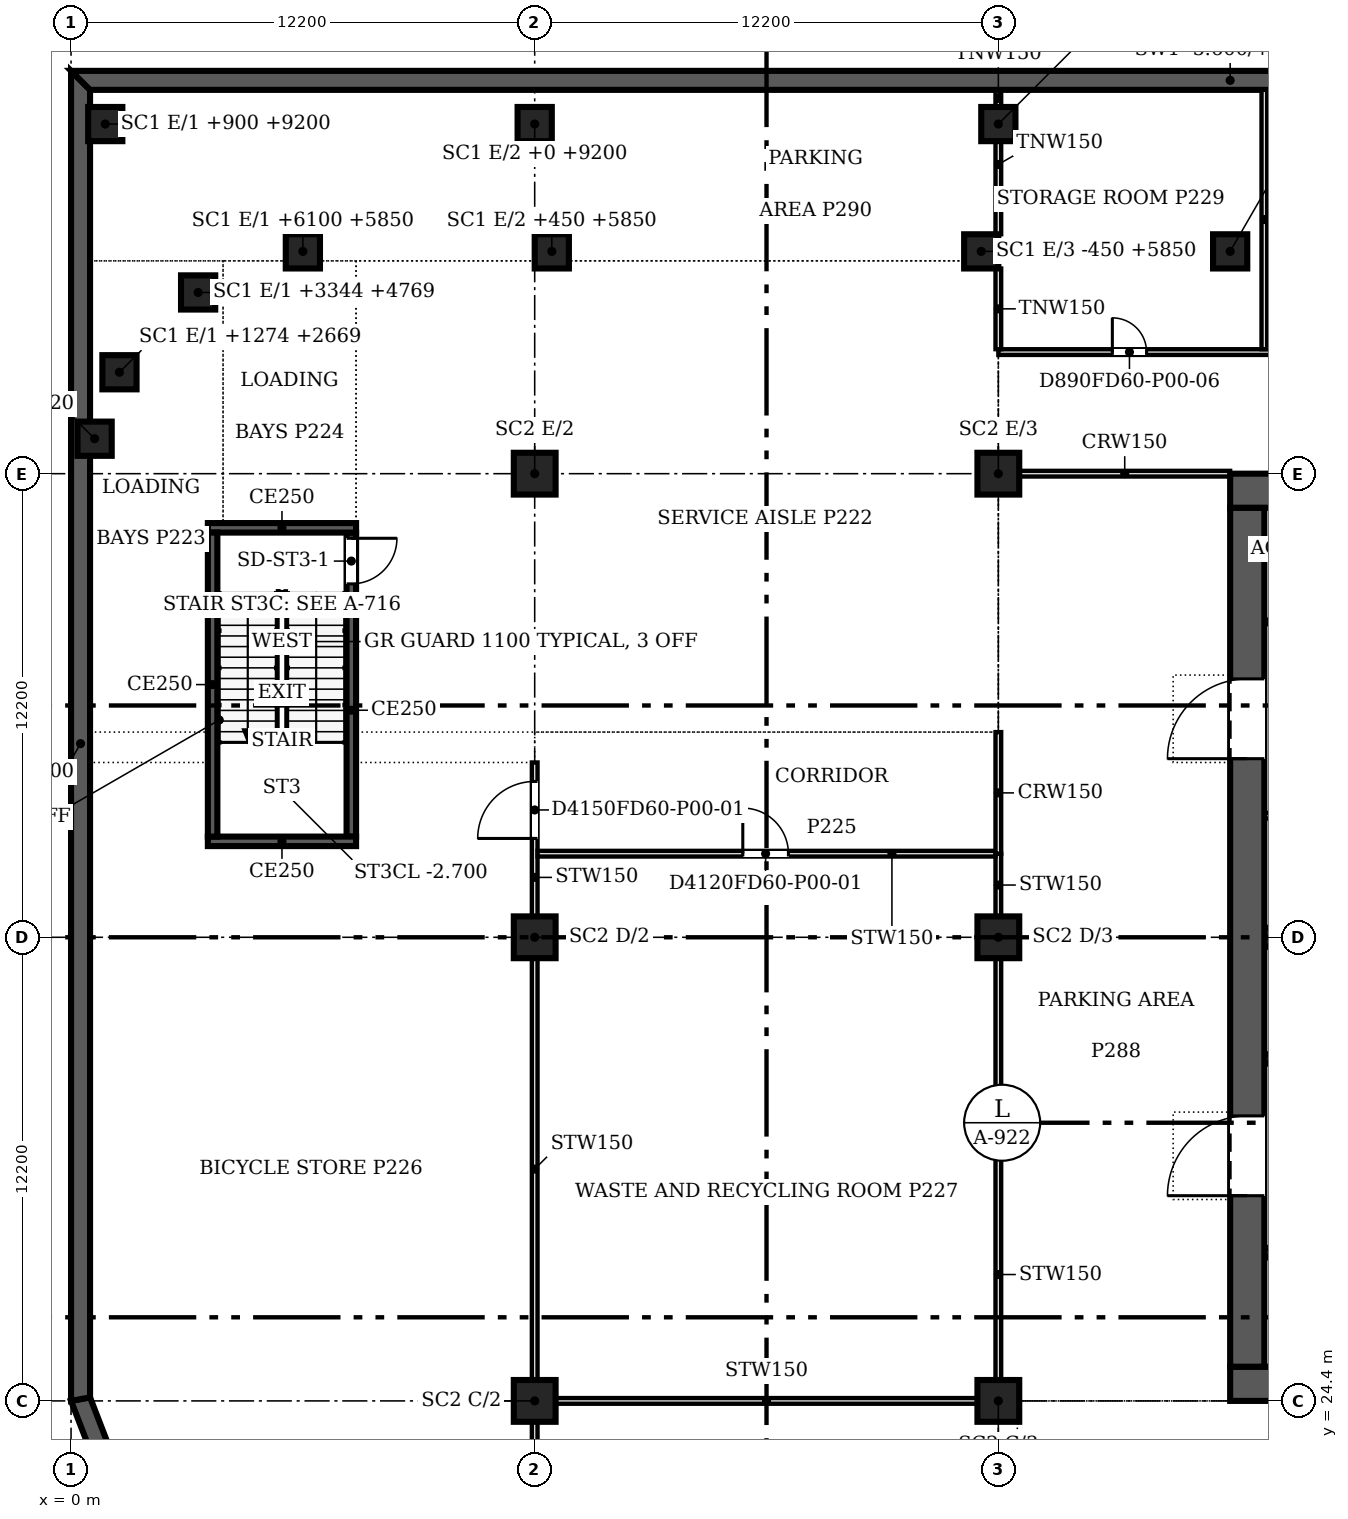
"""IFC4 building model, lengths in metres.
Left out: names, types, materials, properties, quantities, classifications, styles, units other than length and angle.
Written with IfcOpenShell. Run it as: python <this file> out.ifc"""

import sys

from ifc_helpers import new_model, si_unit, direction, frame, frame_2d, origin, origin_2d, place, context, subcontext, project, spatial, polyline, rectangle, outline, extrude, source, transform, mapped, element, fill, save


model = new_model("IFC4")
c1 = context("Model", 3, precision=1e-05, world=origin(), true_north=direction((0.0, 1.0)))
c2 = subcontext(c1, "Body", "Model", "MODEL_VIEW")
j1 = project(units=[si_unit("LENGTHUNIT", "METRE"), si_unit("PLANEANGLEUNIT", "RADIAN")], contexts=[c1])
p1 = place(None, origin())
s1 = spatial("IfcSite", under=j1, at=p1, CompositionType="ELEMENT")
p2 = place(p1, origin())
s2 = spatial("IfcBuilding", under=s1, at=p2, CompositionType="ELEMENT")
p3 = place(p2, frame((0.0, 0.0, -5.4)))
s3 = spatial("IfcBuildingStorey", under=s2, at=p3, CompositionType="ELEMENT", Elevation=-5.4)
p4 = place(p3, frame((0.0, 0.0, -0.2)))
e1 = element("IfcWall", 1, at=p4, inside=s3, PredefinedType="SOLIDWALL", context=c2, shape_type="SweptSolid", body=[
    extrude(outline(polyline([(0.0, 24.4), (1.098, 21.554), (1.526, 21.833), (0.5, 24.493), (0.0, 24.4)])), origin(), (0.0, 0.0, 1.0), 5.6),
])
p5 = place(p3, frame((0.0, 0.0, -0.2)))
e2 = element("IfcWall", 2, at=p5, inside=s3, PredefinedType="SOLIDWALL", context=c2, shape_type="SweptSolid", body=[
    extrude(outline(polyline([(0.0, 24.4), (0.5, 24.493), (0.5, 58.9), (0.0, 59.4), (0.0, 24.4)])), origin(), (0.0, 0.0, 1.0), 5.6),
])
p6 = place(p3, frame((0.0, 0.0, -0.2)))
e3 = element("IfcWall", 3, at=p6, inside=s3, PredefinedType="SOLIDWALL", context=c2, shape_type="SweptSolid", body=[
    extrude(outline(polyline([(0.0, 59.4), (0.5, 58.9), (60.5, 58.9), (61.0, 59.4), (0.0, 59.4)])), origin(), (0.0, 0.0, 1.0), 5.6),
])
for number, where, z_axis, x_axis in (
    (4, (12.65, 54.65, 0.0), (0.0, 0.0, 1.0), (1.0, 0.0, 0.0)),
    (5, (23.95, 54.65, 0.0), (0.0, 0.0, 1.0), (1.0, 0.0, 0.0)),
    (6, (30.5, 54.65, 0.0), (0.0, 0.0, 1.0), (1.0, 0.0, 0.0)),
    (7, (6.1, 54.65, 0.0), (0.0, 0.0, 1.0), (1.0, 0.0, 0.0)),
    (8, (3.344, 53.569, 0.0), (0.0, 0.0, 1.0), (1.0, 0.0, 0.0)),
    (9, (1.274, 51.469, 0.0), (0.0, 0.0, 1.0), (1.0, 0.0, 0.0)),
):
    element("IfcColumn", number, at=place(p3, frame(where, z_axis=z_axis, x_axis=x_axis)), inside=s3, PredefinedType="COLUMN", context=c2, shape_type="SweptSolid", body=[
        extrude(rectangle(XDim=0.9, YDim=0.9, at=origin_2d()), origin(), (0.0, 0.0, 1.0), 5.15),
    ])
for number, where, z_axis, x_axis in (
    (10, (12.2, 24.4, 0.0), (0.0, 0.0, 1.0), (1.0, 0.0, 0.0)),
    (11, (12.2, 36.6, 0.0), (0.0, 0.0, 1.0), (1.0, 0.0, 0.0)),
    (12, (12.2, 48.8, 0.0), (0.0, 0.0, 1.0), (1.0, 0.0, 0.0)),
    (13, (24.4, 24.4, 0.0), (0.0, 0.0, 1.0), (1.0, 0.0, 0.0)),
    (14, (24.4, 36.6, 0.0), (0.0, 0.0, 1.0), (1.0, 0.0, 0.0)),
    (15, (24.4, 48.8, 0.0), (0.0, 0.0, 1.0), (1.0, 0.0, 0.0)),
):
    element("IfcColumn", number, at=place(p3, frame(where, z_axis=z_axis, x_axis=x_axis)), inside=s3, PredefinedType="COLUMN", context=c2, shape_type="SweptSolid", body=[
        extrude(rectangle(XDim=1.1, YDim=1.1, at=origin_2d()), origin(), (0.0, 0.0, 1.0), 5.15),
    ])
for number, where, z_axis, x_axis in (
    (16, (12.2, 58.0, 0.0), (0.0, 0.0, 1.0), (1.0, 0.0, 0.0)),
    (17, (24.4, 58.0, 0.0), (0.0, 0.0, 1.0), (1.0, 0.0, 0.0)),
    (18, (0.9, 58.0, 0.0), (0.0, 0.0, 1.0), (1.0, 0.0, 0.0)),
    (19, (0.62, 49.72, 0.0), (0.0, 0.0, 1.0), (1.0, 0.0, 0.0)),
):
    element("IfcColumn", number, at=place(p3, frame(where, z_axis=z_axis, x_axis=x_axis)), inside=s3, PredefinedType="COLUMN", context=c2, shape_type="SweptSolid", body=[
        extrude(rectangle(XDim=0.9, YDim=0.9, at=origin_2d()), origin(), (0.0, 0.0, 1.0), 5.15),
    ])
p7 = place(p3, frame((54.9, 24.85, 0.0), z_axis=(0.0, 0.0, 1.0), x_axis=(-1.0, 0.0, 0.0)))
e20 = element("IfcWall", 20, at=p7, inside=s3, PredefinedType="SHEAR", context=c2, shape_type="SweptSolid", body=[
    extrude(rectangle(XDim=24.4, YDim=0.9, at=frame_2d((12.2, 0.0))), origin(), (0.0, 0.0, 1.0), 5.4),
])
m1 = source(origin(), c2, "Body", "SweptSolid", [
    extrude(rectangle(XDim=1.2, YDim=2.1, at=frame_2d((0.6, 1.05))), frame((0.0, 0.46, 0.0), z_axis=(0.0, -1.0, 0.0), x_axis=(1.0, 0.0, 0.0)), (0.0, 0.0, 1.0), 0.92),
])
p8 = place(p7, frame((1.5, 0.0, 0.0)))
e21 = element("IfcOpeningElement", 21, at=p8, cuts=e20, PredefinedType="OPENING", context=c2, shape_type="MappedRepresentation", body=[
    mapped(m1, transform((0.0, 0.0, 0.0), scale=1.0)),
])
p9 = place(p3, frame((30.95, 25.3, 0.0), z_axis=(0.0, 0.0, 1.0), x_axis=(0.0, 1.0, 0.0)))
e22 = element("IfcWall", 22, at=p9, inside=s3, PredefinedType="SHEAR", context=c2, shape_type="SweptSolid", body=[
    extrude(rectangle(XDim=22.6, YDim=0.9, at=frame_2d((11.3, 0.0))), origin(), (0.0, 0.0, 1.0), 5.4),
])
m2 = source(origin(), c2, "Body", "SweptSolid", [
    extrude(rectangle(XDim=2.1, YDim=2.4, at=frame_2d((1.05, 1.2))), frame((0.0, 0.46, 0.0), z_axis=(0.0, -1.0, 0.0), x_axis=(1.0, 0.0, 0.0)), (0.0, 0.0, 1.0), 0.92),
])
p10 = place(p9, frame((4.5, 0.0, 0.0)))
e23 = element("IfcOpeningElement", 23, at=p10, cuts=e22, PredefinedType="OPENING", context=c2, shape_type="MappedRepresentation", body=[
    mapped(m2, transform((0.0, 0.0, 0.0), scale=1.0)),
])
p11 = place(p9, frame((16.0, 0.0, 0.0)))
e24 = element("IfcOpeningElement", 24, at=p11, cuts=e22, PredefinedType="OPENING", context=c2, shape_type="MappedRepresentation", body=[
    mapped(m2, transform((0.0, 0.0, 0.0), scale=1.0)),
])
p12 = place(p3, frame((30.5, 48.35, 0.0), z_axis=(0.0, 0.0, 1.0), x_axis=(1.0, 0.0, 0.0)))
e25 = element("IfcWall", 25, at=p12, inside=s3, PredefinedType="SHEAR", context=c2, shape_type="SweptSolid", body=[
    extrude(rectangle(XDim=24.4, YDim=0.9, at=frame_2d((12.2, 0.0))), origin(), (0.0, 0.0, 1.0), 5.4),
])
p13 = place(p3, frame((31.4, 36.6, 0.0), z_axis=(0.0, 0.0, 1.0), x_axis=(1.0, 0.0, 0.0)))
e26 = element("IfcWall", 26, at=p13, inside=s3, PredefinedType="SHEAR", context=c2, shape_type="SweptSolid", body=[
    extrude(rectangle(XDim=16.95, YDim=0.5, at=frame_2d((8.475, 0.0))), origin(), (0.0, 0.0, 1.0), 5.4),
])
for number, where, z_axis, x_axis in (
    (27, (31.4, 33.4, 0.0), (0.0, 0.0, 1.0), (1.0, 0.0, 0.0)),
    (28, (31.4, 28.3, 0.0), (0.0, 0.0, 1.0), (1.0, 0.0, 0.0)),
):
    element("IfcWall", number, at=place(p3, frame(where, z_axis=z_axis, x_axis=x_axis)), inside=s3, PredefinedType="SOLIDWALL", context=c2, shape_type="SweptSolid", body=[
        extrude(rectangle(XDim=11.05, YDim=0.25, at=frame_2d((5.525, 0.0))), origin(), (0.0, 0.0, 1.0), 5.4),
    ])
p14 = place(p3, frame((31.4, 44.9, 0.0), z_axis=(0.0, 0.0, 1.0), x_axis=(1.0, 0.0, 0.0)))
e29 = element("IfcWall", 29, at=p14, inside=s3, PredefinedType="PARTITIONING", context=c2, shape_type="SweptSolid", body=[
    extrude(rectangle(XDim=11.05, YDim=0.12, at=frame_2d((5.525, 0.0))), origin(), (0.0, 0.0, 1.0), 5.15),
])
m3 = source(origin(), c2, "Body", "SweptSolid", [
    extrude(rectangle(XDim=0.9, YDim=2.1, at=frame_2d((0.45, 1.05))), frame((0.0, 0.07, 0.0), z_axis=(0.0, -1.0, 0.0), x_axis=(1.0, 0.0, 0.0)), (0.0, 0.0, 1.0), 0.14),
])
p15 = place(p14, frame((0.962, 0.0, 0.0)))
e30 = element("IfcOpeningElement", 30, at=p15, cuts=e29, PredefinedType="OPENING", context=c2, shape_type="MappedRepresentation", body=[
    mapped(m3, transform((0.0, 0.0, 0.0), scale=1.0)),
])
p16 = place(p14, frame((6.613, 0.0, 0.0)))
e31 = element("IfcOpeningElement", 31, at=p16, cuts=e29, PredefinedType="OPENING", context=c2, shape_type="MappedRepresentation", body=[
    mapped(m3, transform((0.0, 0.0, 0.0), scale=1.0)),
])
p17 = place(p3, frame((38.925, 39.8, 0.0), z_axis=(0.0, 0.0, 1.0), x_axis=(-1.0, 0.0, 0.0)))
e32 = element("IfcWall", 32, at=p17, inside=s3, PredefinedType="PARTITIONING", context=c2, shape_type="SweptSolid", body=[
    extrude(rectangle(XDim=7.525, YDim=0.15, at=frame_2d((3.763, 0.0))), origin(), (0.0, 0.0, 1.0), 5.15),
])
m4 = source(origin(), c2, "Body", "SweptSolid", [
    extrude(rectangle(XDim=0.9, YDim=2.1, at=frame_2d((0.45, 1.05))), frame((0.0, 0.085, 0.0), z_axis=(0.0, -1.0, 0.0), x_axis=(1.0, 0.0, 0.0)), (0.0, 0.0, 1.0), 0.17),
])
p18 = place(p17, frame((5.188, 0.0, 0.0)))
e33 = element("IfcOpeningElement", 33, at=p18, cuts=e32, PredefinedType="OPENING", context=c2, shape_type="MappedRepresentation", body=[
    mapped(m4, transform((0.0, 0.0, 0.0), scale=1.0)),
])
p19 = place(p17, frame((1.425, 0.0, 0.0)))
e34 = element("IfcOpeningElement", 34, at=p19, cuts=e32, PredefinedType="OPENING", context=c2, shape_type="MappedRepresentation", body=[
    mapped(m4, transform((0.0, 0.0, 0.0), scale=1.0)),
])
p20 = place(p3, frame((7.5, 39.125, 0.0), z_axis=(0.0, 0.0, 1.0), x_axis=(-1.0, 0.0, 0.0)))
e35 = element("IfcWall", 35, at=p20, inside=s3, PredefinedType="SOLIDWALL", context=c2, shape_type="SweptSolid", body=[
    extrude(rectangle(XDim=3.9, YDim=0.25, at=frame_2d((1.95, 0.0))), origin(), (0.0, 0.0, 1.0), 5.4),
])
p21 = place(p3, frame((3.725, 39.25, 0.0), z_axis=(0.0, 0.0, 1.0), x_axis=(0.0, 1.0, 0.0)))
e36 = element("IfcWall", 36, at=p21, inside=s3, PredefinedType="SOLIDWALL", context=c2, shape_type="SweptSolid", body=[
    extrude(rectangle(XDim=8.0, YDim=0.25, at=frame_2d((4.0, 0.0))), origin(), (0.0, 0.0, 1.0), 5.4),
])
p22 = place(p3, frame((3.6, 47.375, 0.0), z_axis=(0.0, 0.0, 1.0), x_axis=(1.0, 0.0, 0.0)))
e37 = element("IfcWall", 37, at=p22, inside=s3, PredefinedType="SOLIDWALL", context=c2, shape_type="SweptSolid", body=[
    extrude(rectangle(XDim=3.9, YDim=0.25, at=frame_2d((1.95, 0.0))), origin(), (0.0, 0.0, 1.0), 5.4),
])
p23 = place(p3, frame((7.375, 47.25, 0.0), z_axis=(0.0, 0.0, 1.0), x_axis=(0.0, -1.0, 0.0)))
e38 = element("IfcWall", 38, at=p23, inside=s3, PredefinedType="SOLIDWALL", context=c2, shape_type="SweptSolid", body=[
    extrude(rectangle(XDim=8.0, YDim=0.25, at=frame_2d((4.0, 0.0))), origin(), (0.0, 0.0, 1.0), 5.4),
])
m5 = source(origin(), c2, "Body", "SweptSolid", [
    extrude(rectangle(XDim=1.2, YDim=2.1, at=frame_2d((0.6, 1.05))), frame((0.0, 0.135, 0.0), z_axis=(0.0, -1.0, 0.0), x_axis=(1.0, 0.0, 0.0)), (0.0, 0.0, 1.0), 0.27),
])
p24 = place(p23, frame((0.15, 0.0, 0.0)))
e39 = element("IfcOpeningElement", 39, at=p24, cuts=e38, PredefinedType="OPENING", context=c2, shape_type="MappedRepresentation", body=[
    mapped(m5, transform((0.0, 0.0, 0.0), scale=1.0)),
])
p25 = place(p3, frame((12.2, 18.8, 0.0), z_axis=(0.0, 0.0, 1.0), x_axis=(0.0, 1.0, 0.0)))
e40 = element("IfcWall", 40, at=p25, inside=s3, PredefinedType="PARTITIONING", context=c2, shape_type="SweptSolid", body=[
    extrude(rectangle(XDim=5.049, YDim=0.15, at=frame_2d((2.524, 0.0))), origin(), (0.0, 0.0, 1.0), 4.315),
])
for number, where, z_axis, x_axis in (
    (41, (12.751, 24.4, 0.0), (0.0, 0.0, 1.0), (1.0, 0.0, 0.0)),
    (42, (12.2, 24.951, 0.0), (0.0, 0.0, 1.0), (0.0, 1.0, 0.0)),
    (43, (24.4, 24.951, 0.0), (0.0, 0.0, 1.0), (0.0, 1.0, 0.0)),
):
    element("IfcWall", number, at=place(p3, frame(where, z_axis=z_axis, x_axis=x_axis)), inside=s3, PredefinedType="PARTITIONING", context=c2, shape_type="SweptSolid", body=[
        extrude(rectangle(XDim=11.098, YDim=0.15, at=frame_2d((5.549, 0.0))), origin(), (0.0, 0.0, 1.0), 4.315),
    ])
p26 = place(p3, frame((12.2, 37.151, 0.0), z_axis=(0.0, 0.0, 1.0), x_axis=(0.0, 1.0, 0.0)))
e44 = element("IfcWall", 44, at=p26, inside=s3, PredefinedType="PARTITIONING", context=c2, shape_type="SweptSolid", body=[
    extrude(rectangle(XDim=4.049, YDim=0.15, at=frame_2d((2.024, 0.0))), origin(), (0.0, 0.0, 1.0), 4.315),
])
m6 = source(origin(), c2, "Body", "SweptSolid", [
    extrude(rectangle(XDim=1.5, YDim=2.1, at=frame_2d((0.75, 1.05))), frame((0.0, 0.085, 0.0), z_axis=(0.0, -1.0, 0.0), x_axis=(1.0, 0.0, 0.0)), (0.0, 0.0, 1.0), 0.17),
])
p27 = place(p26, frame((2.05, 0.0, 0.0)))
e45 = element("IfcOpeningElement", 45, at=p27, cuts=e44, PredefinedType="OPENING", context=c2, shape_type="MappedRepresentation", body=[
    mapped(m6, transform((0.0, 0.0, 0.0), scale=1.0)),
])
p28 = place(p3, frame((24.4, 37.151, 0.0), z_axis=(0.0, 0.0, 1.0), x_axis=(0.0, 1.0, 0.0)))
e46 = element("IfcWall", 46, at=p28, inside=s3, PredefinedType="PARTITIONING", context=c2, shape_type="SweptSolid", body=[
    extrude(rectangle(XDim=1.648, YDim=0.15, at=frame_2d((0.824, 0.0))), origin(), (0.0, 0.0, 1.0), 4.315),
])
p29 = place(p3, frame((24.324, 38.8, 0.0), z_axis=(0.0, 0.0, 1.0), x_axis=(-1.0, 0.0, 0.0)))
e47 = element("IfcWall", 47, at=p29, inside=s3, PredefinedType="PARTITIONING", context=c2, shape_type="SweptSolid", body=[
    extrude(rectangle(XDim=12.048, YDim=0.15, at=frame_2d((6.024, 0.0))), origin(), (0.0, 0.0, 1.0), 4.315),
])
m7 = source(origin(), c2, "Body", "SweptSolid", [
    extrude(rectangle(XDim=1.2, YDim=2.1, at=frame_2d((0.6, 1.05))), frame((0.0, 0.085, 0.0), z_axis=(0.0, -1.0, 0.0), x_axis=(1.0, 0.0, 0.0)), (0.0, 0.0, 1.0), 0.17),
])
p30 = place(p29, frame((5.448, 0.0, 0.0)))
e48 = element("IfcOpeningElement", 48, at=p30, cuts=e47, PredefinedType="OPENING", context=c2, shape_type="MappedRepresentation", body=[
    mapped(m7, transform((0.0, 0.0, 0.0), scale=1.0)),
])
p31 = place(p3, frame((24.4, 38.8, 0.0), z_axis=(0.0, 0.0, 1.0), x_axis=(0.0, 1.0, 0.0)))
e49 = element("IfcWall", 49, at=p31, inside=s3, PredefinedType="PARTITIONING", context=c2, shape_type="SweptSolid", body=[
    extrude(rectangle(XDim=3.2, YDim=0.15, at=frame_2d((1.6, 0.0))), origin(), (0.0, 0.0, 1.0), 4.315),
])
p32 = place(p3, frame((24.951, 48.8, 0.0), z_axis=(0.0, 0.0, 1.0), x_axis=(1.0, 0.0, 0.0)))
e50 = element("IfcWall", 50, at=p32, inside=s3, PredefinedType="PARTITIONING", context=c2, shape_type="SweptSolid", body=[
    extrude(rectangle(XDim=5.549, YDim=0.15, at=frame_2d((2.774, 0.0))), origin(), (0.0, 0.0, 1.0), 4.315),
])
p33 = place(p3, frame((24.4, 52.0, 0.0), z_axis=(0.0, 0.0, 1.0), x_axis=(1.0, 0.0, 0.0)))
e51 = element("IfcWall", 51, at=p33, inside=s3, PredefinedType="PARTITIONING", context=c2, shape_type="SweptSolid", body=[
    extrude(rectangle(XDim=34.818, YDim=0.15, at=frame_2d((17.409, 0.0))), origin(), (0.0, 0.0, 1.0), 4.315),
])
p34 = place(p33, frame((9.601, 0.0, 0.0)))
e52 = element("IfcOpeningElement", 52, at=p34, cuts=e51, PredefinedType="OPENING", context=c2, shape_type="MappedRepresentation", body=[
    mapped(m4, transform((0.0, 0.0, 0.0), scale=1.0)),
])
p35 = place(p33, frame((23.101, 0.0, 0.0)))
e53 = element("IfcOpeningElement", 53, at=p35, cuts=e51, PredefinedType="OPENING", context=c2, shape_type="MappedRepresentation", body=[
    mapped(m4, transform((0.0, 0.0, 0.0), scale=1.0)),
])
p36 = place(p33, frame((3.0, 0.0, 0.0)))
e54 = element("IfcOpeningElement", 54, at=p36, cuts=e51, PredefinedType="OPENING", context=c2, shape_type="MappedRepresentation", body=[
    mapped(m4, transform((0.0, 0.0, 0.0), scale=1.0)),
])
p37 = place(p33, frame((16.1, 0.0, 0.0)))
e55 = element("IfcOpeningElement", 55, at=p37, cuts=e51, PredefinedType="OPENING", context=c2, shape_type="MappedRepresentation", body=[
    mapped(m4, transform((0.0, 0.0, 0.0), scale=1.0)),
])
p38 = place(p33, frame((30.5, 0.0, 0.0)))
e56 = element("IfcOpeningElement", 56, at=p38, cuts=e51, PredefinedType="OPENING", context=c2, shape_type="MappedRepresentation", body=[
    mapped(m4, transform((0.0, 0.0, 0.0), scale=1.0)),
])
p39 = place(p3, frame((24.4, 52.076, 0.0), z_axis=(0.0, 0.0, 1.0), x_axis=(0.0, 1.0, 0.0)))
e57 = element("IfcWall", 57, at=p39, inside=s3, PredefinedType="PARTITIONING", context=c2, shape_type="SweptSolid", body=[
    extrude(rectangle(XDim=2.123, YDim=0.15, at=frame_2d((1.062, 0.0))), origin(), (0.0, 0.0, 1.0), 4.315),
])
p40 = place(p3, frame((31.4, 52.076, 0.0), z_axis=(0.0, 0.0, 1.0), x_axis=(0.0, 1.0, 0.0)))
e58 = element("IfcWall", 58, at=p40, inside=s3, PredefinedType="PARTITIONING", context=c2, shape_type="SweptSolid", body=[
    extrude(rectangle(XDim=6.824, YDim=0.15, at=frame_2d((3.412, 0.0))), origin(), (0.0, 0.0, 1.0), 4.315),
])
p41 = place(p3, frame((24.4, 55.101, 0.0), z_axis=(0.0, 0.0, 1.0), x_axis=(0.0, 1.0, 0.0)))
e59 = element("IfcWall", 59, at=p41, inside=s3, PredefinedType="PARTITIONING", context=c2, shape_type="SweptSolid", body=[
    extrude(rectangle(XDim=2.448, YDim=0.15, at=frame_2d((1.224, 0.0))), origin(), (0.0, 0.0, 1.0), 4.315),
])
p42 = place(p3, frame((24.4, 58.451, 0.0), z_axis=(0.0, 0.0, 1.0), x_axis=(0.0, 1.0, 0.0)))
e60 = element("IfcWall", 60, at=p42, inside=s3, PredefinedType="PARTITIONING", context=c2, shape_type="SweptSolid", body=[
    extrude(rectangle(XDim=0.449, YDim=0.15, at=frame_2d((0.225, 0.0))), origin(), (0.0, 0.0, 1.0), 4.315),
])
m8 = source(origin(), c2, "Body", "SweptSolid", [
    extrude(rectangle(XDim=2.1, YDim=2.4, at=frame_2d((1.05, 1.2))), frame((0.0, 0.025, 0.0), z_axis=(0.0, -1.0, 0.0), x_axis=(1.0, 0.0, 0.0)), (0.0, 0.0, 1.0), 0.05),
])
p43 = place(p10, origin())
e61 = element("IfcDoor", 61, at=p43, inside=s3, OperationType="DOUBLE_DOOR_SINGLE_SWING", PredefinedType="DOOR", context=c2, shape_type="MappedRepresentation", body=[
    mapped(m8, transform((0.0, 0.0, 0.0), scale=1.0)),
])
fill(e23, e61)
p44 = place(p11, origin())
e62 = element("IfcDoor", 62, at=p44, inside=s3, OperationType="DOUBLE_DOOR_SINGLE_SWING", PredefinedType="DOOR", context=c2, shape_type="MappedRepresentation", body=[
    mapped(m8, transform((0.0, 0.0, 0.0), scale=1.0)),
])
fill(e24, e62)
m9 = source(origin(), c2, "Body", "SweptSolid", [
    extrude(rectangle(XDim=1.2, YDim=2.1, at=frame_2d((0.6, 1.05))), frame((0.0, 0.025, 0.0), z_axis=(0.0, -1.0, 0.0), x_axis=(1.0, 0.0, 0.0)), (0.0, 0.0, 1.0), 0.05),
])
p45 = place(p24, origin())
e63 = element("IfcDoor", 63, at=p45, inside=s3, OperationType="SINGLE_SWING_LEFT", PredefinedType="DOOR", context=c2, shape_type="MappedRepresentation", body=[
    mapped(m9, transform((0.0, 0.0, 0.0), scale=1.0)),
])
fill(e39, e63)
m10 = source(origin(), c2, "Body", "SweptSolid", [
    extrude(rectangle(XDim=1.5, YDim=2.1, at=frame_2d((0.75, 1.05))), frame((0.0, 0.025, 0.0), z_axis=(0.0, -1.0, 0.0), x_axis=(1.0, 0.0, 0.0)), (0.0, 0.0, 1.0), 0.05),
])
p46 = place(p27, origin())
e64 = element("IfcDoor", 64, at=p46, inside=s3, OperationType="SINGLE_SWING_LEFT", PredefinedType="DOOR", context=c2, shape_type="MappedRepresentation", body=[
    mapped(m10, transform((0.0, 0.0, 0.0), scale=1.0)),
])
fill(e45, e64)
m11 = source(origin(), c2, "Body", "SweptSolid", [
    extrude(rectangle(XDim=0.9, YDim=2.1, at=frame_2d((0.45, 1.05))), frame((0.0, 0.025, 0.0), z_axis=(0.0, -1.0, 0.0), x_axis=(1.0, 0.0, 0.0)), (0.0, 0.0, 1.0), 0.05),
])
p47 = place(p36, origin())
e65 = element("IfcDoor", 65, at=p47, inside=s3, OperationType="SINGLE_SWING_LEFT", PredefinedType="DOOR", context=c2, shape_type="MappedRepresentation", body=[
    mapped(m11, transform((0.0, 0.0, 0.0), scale=1.0)),
])
fill(e54, e65)
p48 = place(p30, origin())
e66 = element("IfcDoor", 66, at=p48, inside=s3, OperationType="SINGLE_SWING_RIGHT", PredefinedType="DOOR", context=c2, shape_type="MappedRepresentation", body=[
    mapped(m9, transform((0.0, 0.0, 0.0), scale=1.0)),
])
fill(e48, e66)
save(model, sys.argv[1])
